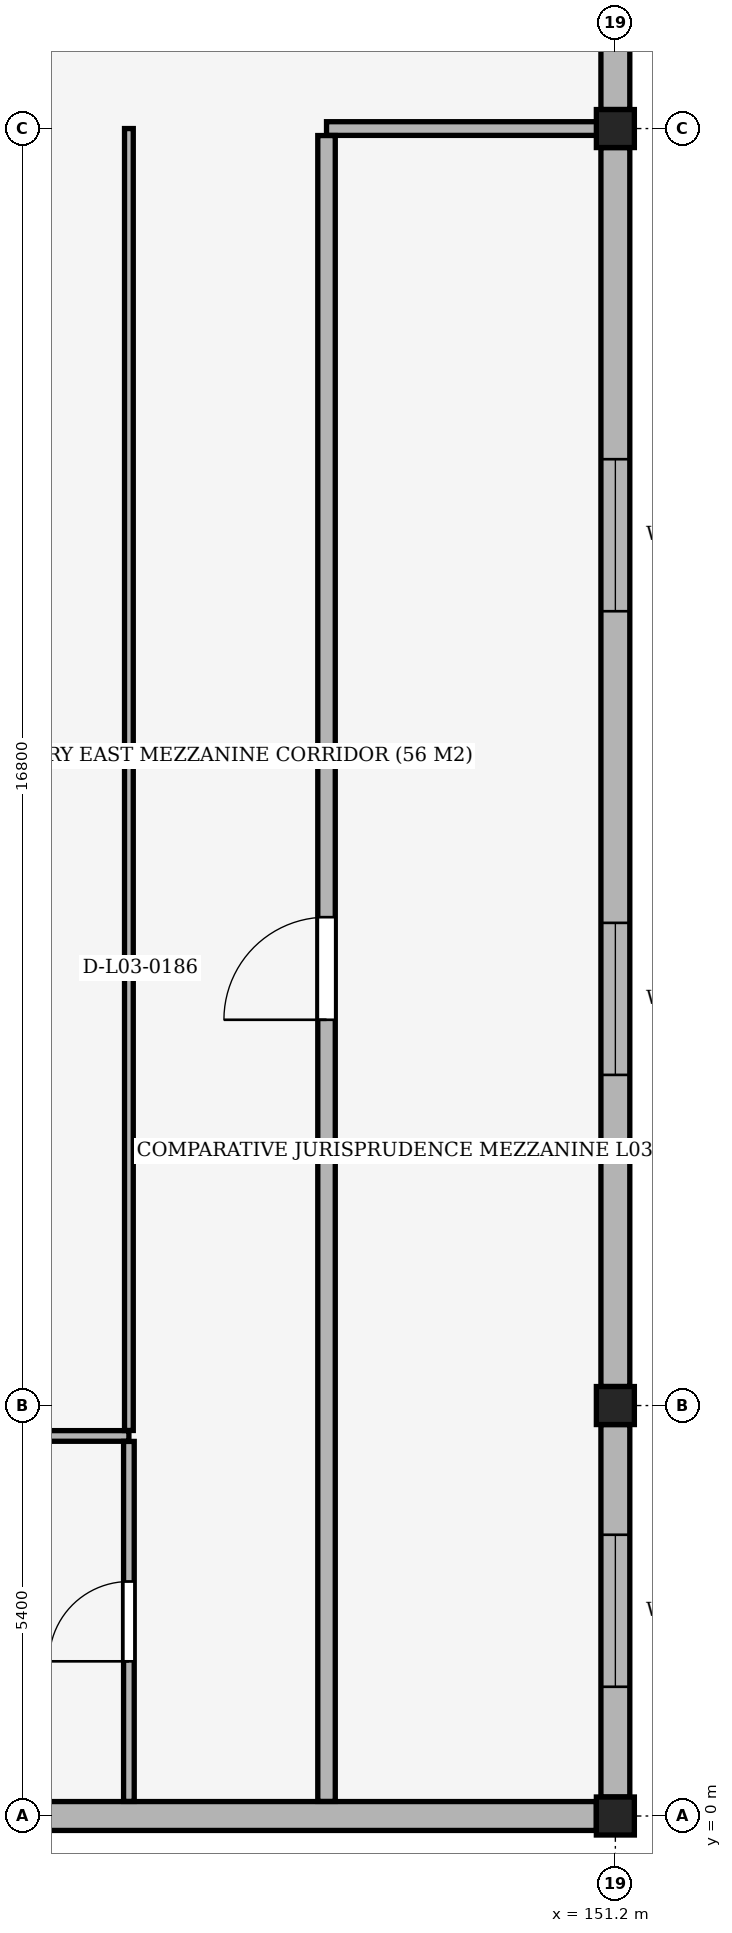
"""IFC4 building model, lengths in metres.
Left out: names, types, materials, properties, quantities, classifications, styles, units other than length and angle.
Written with IfcOpenShell. Run it as: python <this file> out.ifc"""

import sys

from ifc_helpers import new_model, si_unit, direction, frame, frame_2d, origin, origin_2d, place, context, subcontext, project, spatial, rectangle, extrude, element, fill, save


model = new_model("IFC4")
c1 = context("Model", 3, precision=1e-05, world=origin(), true_north=direction((0.0, 1.0)))
c2 = subcontext(c1, "Body", "Model", "MODEL_VIEW")
j1 = project(units=[si_unit("LENGTHUNIT", "METRE"), si_unit("PLANEANGLEUNIT", "RADIAN")], contexts=[c1])
p1 = place(None, origin())
s1 = spatial("IfcSite", under=j1, at=p1, CompositionType="ELEMENT")
p2 = place(p1, origin())
s2 = spatial("IfcBuilding", under=s1, at=p2, CompositionType="ELEMENT")
p3 = place(p2, frame((0.0, 0.0, 15.3)))
s3 = spatial("IfcBuildingStorey", under=s2, at=p3, CompositionType="ELEMENT", Elevation=15.3)
for number, where, z_axis, x_axis in (
    (1, (151.2, 0.0, 0.0), (0.0, 0.0, 1.0), (1.0, 0.0, 0.0)),
    (2, (151.2, 5.4, 0.0), (0.0, 0.0, 1.0), (1.0, 0.0, 0.0)),
    (3, (151.2, 22.2, 0.0), (0.0, 0.0, 1.0), (1.0, 0.0, 0.0)),
):
    element("IfcColumn", number, at=place(p3, frame(where, z_axis=z_axis, x_axis=x_axis)), inside=s3, PredefinedType="COLUMN", context=c2, shape_type="SweptSolid", body=[
        extrude(rectangle(XDim=0.5, YDim=0.5, at=origin_2d()), origin(), (0.0, 0.0, 1.0), 5.1),
    ])
p4 = place(p3, frame((151.2, 26.75, 0.0), z_axis=(0.0, 0.0, 1.0), x_axis=(0.0, -1.0, 0.0)))
e4 = element("IfcWall", 4, at=p4, inside=s3, PredefinedType="SOLIDWALL", context=c2, shape_type="SweptSolid", body=[
    extrude(rectangle(XDim=4.3, YDim=0.38, at=frame_2d((2.15, 0.0))), origin(), (0.0, 0.0, 1.0), 3.79),
])
p5 = place(p3, frame((151.2, 21.95, 0.0), z_axis=(0.0, 0.0, 1.0), x_axis=(0.0, -1.0, 0.0)))
e5 = element("IfcWall", 5, at=p5, inside=s3, PredefinedType="SOLIDWALL", context=c2, shape_type="SweptSolid", body=[
    extrude(rectangle(XDim=16.3, YDim=0.38, at=frame_2d((8.15, 0.0))), origin(), (0.0, 0.0, 1.0), 3.79),
])
p6 = place(p5, frame((4.1, 0.0, 2.1)))
e6 = element("IfcOpeningElement", 6, at=p6, cuts=e5, PredefinedType="OPENING", context=c2, shape_type="SweptSolid", body=[
    extrude(rectangle(XDim=2.0, YDim=1.2, at=frame_2d((1.0, 0.6))), frame((0.0, 0.205, 0.0), z_axis=(0.0, -1.0, 0.0), x_axis=(1.0, 0.0, 0.0)), (0.0, 0.0, 1.0), 0.41),
])
p7 = place(p5, frame((10.2, 0.0, 2.1)))
e7 = element("IfcOpeningElement", 7, at=p7, cuts=e5, PredefinedType="OPENING", context=c2, shape_type="SweptSolid", body=[
    extrude(rectangle(XDim=2.0, YDim=1.2, at=frame_2d((1.0, 0.6))), frame((0.0, 0.205, 0.0), z_axis=(0.0, -1.0, 0.0), x_axis=(1.0, 0.0, 0.0)), (0.0, 0.0, 1.0), 0.41),
])
p8 = place(p3, frame((151.2, 5.15, 0.0), z_axis=(0.0, 0.0, 1.0), x_axis=(0.0, -1.0, 0.0)))
e8 = element("IfcWall", 8, at=p8, inside=s3, PredefinedType="SOLIDWALL", context=c2, shape_type="SweptSolid", body=[
    extrude(rectangle(XDim=4.9, YDim=0.38, at=frame_2d((2.45, 0.0))), origin(), (0.0, 0.0, 1.0), 3.79),
])
p9 = place(p8, frame((1.45, 0.0, 2.1)))
e9 = element("IfcOpeningElement", 9, at=p9, cuts=e8, PredefinedType="OPENING", context=c2, shape_type="SweptSolid", body=[
    extrude(rectangle(XDim=2.0, YDim=1.2, at=frame_2d((1.0, 0.6))), frame((0.0, 0.205, 0.0), z_axis=(0.0, -1.0, 0.0), x_axis=(1.0, 0.0, 0.0)), (0.0, 0.0, 1.0), 0.41),
])
p10 = place(p3, frame((150.95, 0.0, 0.0), z_axis=(0.0, 0.0, 1.0), x_axis=(-1.0, 0.0, 0.0)))
e10 = element("IfcWall", 10, at=p10, inside=s3, PredefinedType="SOLIDWALL", context=c2, shape_type="SweptSolid", body=[
    extrude(rectangle(XDim=7.9, YDim=0.38, at=frame_2d((3.95, 0.0))), origin(), (0.0, 0.0, 1.0), 4.14),
])
p11 = place(p3, frame((117.8, 5.0, 0.0), z_axis=(0.0, 0.0, 1.0), x_axis=(1.0, 0.0, 0.0)))
e11 = element("IfcWall", 11, at=p11, inside=s3, PredefinedType="PARTITIONING", context=c2, shape_type="SweptSolid", body=[
    extrude(rectangle(XDim=27.0, YDim=0.14, at=frame_2d((13.5, 0.0))), origin(), (0.0, 0.0, 1.0), 4.29),
])
p12 = place(p3, frame((147.4, 22.2, 0.0), z_axis=(0.0, 0.0, 1.0), x_axis=(1.0, 0.0, 0.0)))
e12 = element("IfcWall", 12, at=p12, inside=s3, PredefinedType="PARTITIONING", context=c2, shape_type="SweptSolid", body=[
    extrude(rectangle(XDim=3.769, YDim=0.18, at=frame_2d((1.885, 0.0))), origin(), (0.0, 0.0, 1.0), 3.79),
])
p13 = place(p3, frame((144.8, 0.192, 0.0), z_axis=(0.0, 0.0, 1.0), x_axis=(0.0, 1.0, 0.0)))
e13 = element("IfcWall", 13, at=p13, inside=s3, PredefinedType="PARTITIONING", context=c2, shape_type="SweptSolid", body=[
    extrude(rectangle(XDim=4.736, YDim=0.14, at=frame_2d((2.368, 0.0))), origin(), (0.0, 0.0, 1.0), 4.14),
])
p14 = place(p13, frame((1.843, 0.0, 0.0)))
e14 = element("IfcOpeningElement", 14, at=p14, cuts=e13, PredefinedType="OPENING", context=c2, shape_type="SweptSolid", body=[
    extrude(rectangle(XDim=1.05, YDim=2.1, at=frame_2d((0.525, 1.05))), frame((0.0, 0.085, 0.0), z_axis=(0.0, -1.0, 0.0), x_axis=(1.0, 0.0, 0.0)), (0.0, 0.0, 1.0), 0.17),
])
p15 = place(p3, frame((144.8, 5.072, 0.0), z_axis=(0.0, 0.0, 1.0), x_axis=(0.0, 1.0, 0.0)))
e15 = element("IfcWall", 15, at=p15, inside=s3, PredefinedType="PARTITIONING", context=c2, shape_type="SweptSolid", body=[
    extrude(rectangle(XDim=17.128, YDim=0.115, at=frame_2d((8.564, 0.0))), origin(), (0.0, 0.0, 1.0), 4.14),
])
p16 = place(p3, frame((147.4, 0.192, 0.0), z_axis=(0.0, 0.0, 1.0), x_axis=(0.0, 1.0, 0.0)))
e16 = element("IfcWall", 16, at=p16, inside=s3, PredefinedType="SOLIDWALL", context=c2, shape_type="SweptSolid", body=[
    extrude(rectangle(XDim=21.916, YDim=0.23, at=frame_2d((10.958, 0.0))), origin(), (0.0, 0.0, 1.0), 4.14),
])
p17 = place(p16, frame((10.283, 0.0, 0.0)))
e17 = element("IfcOpeningElement", 17, at=p17, cuts=e16, PredefinedType="OPENING", context=c2, shape_type="SweptSolid", body=[
    extrude(rectangle(XDim=1.35, YDim=2.2, at=frame_2d((0.675, 1.1))), frame((0.0, 0.13, 0.0), z_axis=(0.0, -1.0, 0.0), x_axis=(1.0, 0.0, 0.0)), (0.0, 0.0, 1.0), 0.26),
])
p18 = place(p6, origin())
e18 = element("IfcWindow", 18, at=p18, inside=s3, PartitioningType="SINGLE_PANEL", PredefinedType="WINDOW", context=c2, shape_type="SweptSolid", body=[
    extrude(rectangle(XDim=2.0, YDim=1.2, at=frame_2d((1.0, 0.6))), frame((0.0, 0.03, 0.0), z_axis=(0.0, -1.0, 0.0), x_axis=(1.0, 0.0, 0.0)), (0.0, 0.0, 1.0), 0.06),
])
fill(e6, e18)
p19 = place(p7, origin())
e19 = element("IfcWindow", 19, at=p19, inside=s3, PartitioningType="SINGLE_PANEL", PredefinedType="WINDOW", context=c2, shape_type="SweptSolid", body=[
    extrude(rectangle(XDim=2.0, YDim=1.2, at=frame_2d((1.0, 0.6))), frame((0.0, 0.03, 0.0), z_axis=(0.0, -1.0, 0.0), x_axis=(1.0, 0.0, 0.0)), (0.0, 0.0, 1.0), 0.06),
])
fill(e7, e19)
p20 = place(p9, origin())
e20 = element("IfcWindow", 20, at=p20, inside=s3, PartitioningType="SINGLE_PANEL", PredefinedType="WINDOW", context=c2, shape_type="SweptSolid", body=[
    extrude(rectangle(XDim=2.0, YDim=1.2, at=frame_2d((1.0, 0.6))), frame((0.0, 0.03, 0.0), z_axis=(0.0, -1.0, 0.0), x_axis=(1.0, 0.0, 0.0)), (0.0, 0.0, 1.0), 0.06),
])
fill(e9, e20)
p21 = place(p14, origin())
e21 = element("IfcDoor", 21, at=p21, inside=s3, OperationType="SINGLE_SWING_LEFT", PredefinedType="DOOR", context=c2, shape_type="SweptSolid", body=[
    extrude(rectangle(XDim=1.05, YDim=2.1, at=frame_2d((0.525, 1.05))), frame((0.0, 0.025, 0.0), z_axis=(0.0, -1.0, 0.0), x_axis=(1.0, 0.0, 0.0)), (0.0, 0.0, 1.0), 0.05),
])
fill(e14, e21)
p22 = place(p17, origin())
e22 = element("IfcDoor", 22, at=p22, inside=s3, OperationType="SINGLE_SWING_LEFT", PredefinedType="DOOR", context=c2, shape_type="SweptSolid", body=[
    extrude(rectangle(XDim=1.35, YDim=2.2, at=frame_2d((0.675, 1.1))), frame((0.0, 0.025, 0.0), z_axis=(0.0, -1.0, 0.0), x_axis=(1.0, 0.0, 0.0)), (0.0, 0.0, 1.0), 0.05),
])
fill(e17, e22)
save(model, sys.argv[1])
